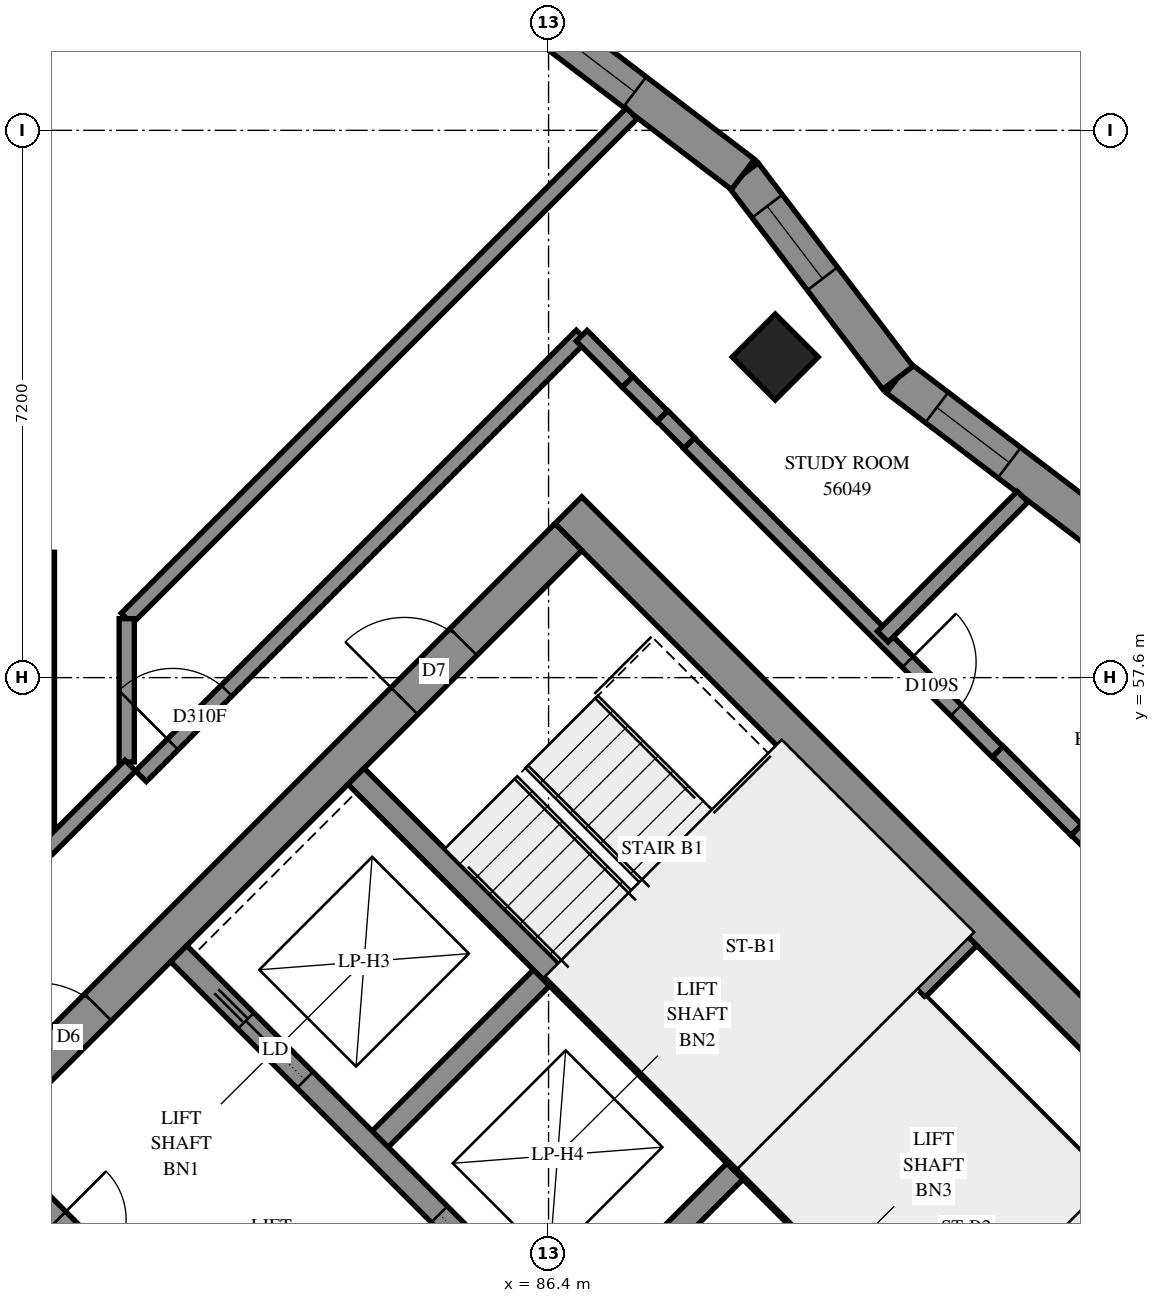
"""IFC4 building model, lengths in metres.
Left out: names, types, materials, properties, quantities, classifications, styles, units other than length and angle.
Written with IfcOpenShell. Run it as: python <this file> out.ifc"""

import sys

from ifc_helpers import new_model, si_unit, direction, frame, frame_2d, origin, origin_2d, place, context, subcontext, project, spatial, polyline, rectangle, outline, extrude, element, fill, save


model = new_model("IFC4")
c1 = context("Model", 3, precision=1e-05, world=origin(), true_north=direction((0.0, 1.0)))
c2 = subcontext(c1, "Body", "Model", "MODEL_VIEW")
j1 = project(units=[si_unit("LENGTHUNIT", "METRE"), si_unit("PLANEANGLEUNIT", "RADIAN")], contexts=[c1])
p1 = place(None, origin())
s1 = spatial("IfcSite", under=j1, at=p1, CompositionType="ELEMENT")
p2 = place(p1, origin())
s2 = spatial("IfcBuilding", under=s1, at=p2, CompositionType="ELEMENT")
p3 = place(p2, frame((0.0, 0.0, 206.6)))
s3 = spatial("IfcBuildingStorey", under=s2, at=p3, CompositionType="ELEMENT", Elevation=206.6)
p4 = place(p3, frame((89.382, 61.818, 0.0), z_axis=(0.0, 0.0, 1.0), x_axis=(0.7071067812, -0.7071067812, 0.0)))
e1 = element("IfcColumn", 1, at=p4, inside=s3, PredefinedType="COLUMN", context=c2, shape_type="SweptSolid", body=[
    extrude(rectangle(XDim=0.8, YDim=0.8, at=origin_2d()), origin(), (0.0, 0.0, 1.0), 3.1),
])
p5 = place(p3, frame((86.66, 59.802, -0.3), z_axis=(0.0, 0.0, 1.0), x_axis=(0.7071067812, -0.7071067812, 0.0)))
e2 = element("IfcWall", 2, at=p5, inside=s3, PredefinedType="SHEAR", context=c2, shape_type="SweptSolid", body=[
    extrude(rectangle(XDim=15.4, YDim=0.5, at=frame_2d((7.7, 0.0))), origin(), (0.0, 0.0, 1.0), 2.7),
])
p6 = place(p5, frame((10.5, 0.0, 0.3)))
e3 = element("IfcOpeningElement", 3, at=p6, cuts=e2, PredefinedType="OPENING", context=c2, shape_type="SweptSolid", body=[
    extrude(rectangle(XDim=0.8, YDim=2.1, at=frame_2d((0.4, 1.05))), frame((0.0, 0.26, 0.0), z_axis=(0.0, -1.0, 0.0), x_axis=(1.0, 0.0, 0.0)), (0.0, 0.0, 1.0), 0.52),
])
p7 = place(p3, frame((76.478, 49.267, -0.3), z_axis=(0.0, 0.0, 1.0), x_axis=(0.7071067812, 0.7071067812, 0.0)))
e4 = element("IfcWall", 4, at=p7, inside=s3, PredefinedType="SHEAR", context=c2, shape_type="SweptSolid", body=[
    extrude(rectangle(XDim=14.4, YDim=0.5, at=frame_2d((7.2, 0.0))), origin(), (0.0, 0.0, 1.0), 2.7),
])
p8 = place(p7, frame((4.55, 0.0, 0.3)))
e5 = element("IfcOpeningElement", 5, at=p8, cuts=e4, PredefinedType="OPENING", context=c2, shape_type="SweptSolid", body=[
    extrude(rectangle(XDim=1.1, YDim=2.1, at=frame_2d((0.55, 1.05))), frame((0.0, 0.26, 0.0), z_axis=(0.0, -1.0, 0.0), x_axis=(1.0, 0.0, 0.0)), (0.0, 0.0, 1.0), 0.52),
])
p9 = place(p7, frame((11.35, 0.0, 0.3)))
e6 = element("IfcOpeningElement", 6, at=p9, cuts=e4, PredefinedType="OPENING", context=c2, shape_type="SweptSolid", body=[
    extrude(rectangle(XDim=1.1, YDim=2.1, at=frame_2d((0.55, 1.05))), frame((0.0, 0.26, 0.0), z_axis=(0.0, -1.0, 0.0), x_axis=(1.0, 0.0, 0.0)), (0.0, 0.0, 1.0), 0.52),
])
p10 = place(p3, frame((84.079, 51.423, 0.0), z_axis=(0.0, 0.0, 1.0), x_axis=(0.7071219326, 0.7070916295, 0.0)))
e7 = element("IfcWall", 7, at=p10, inside=s3, PredefinedType="SOLIDWALL", context=c2, shape_type="SweptSolid", body=[
    extrude(rectangle(XDim=3.3, YDim=0.3, at=frame_2d((1.65, 0.0))), origin(), (0.0, 0.0, 1.0), 3.1),
])
p11 = place(p3, frame((86.625, 48.878, 0.0), z_axis=(0.0, 0.0, 1.0), x_axis=(0.7071067812, 0.7071067812, 0.0)))
e8 = element("IfcWall", 8, at=p11, inside=s3, PredefinedType="SOLIDWALL", context=c2, shape_type="SweptSolid", body=[
    extrude(rectangle(XDim=3.3, YDim=0.3, at=frame_2d((1.65, 0.0))), origin(), (0.0, 0.0, 1.0), 3.1),
])
p12 = place(p3, frame((78.988, 51.423, 0.0), z_axis=(0.0, 0.0, 1.0), x_axis=(0.7071067812, -0.7071067812, 0.0)))
e9 = element("IfcWall", 9, at=p12, inside=s3, PredefinedType="SOLIDWALL", context=c2, shape_type="SweptSolid", body=[
    extrude(rectangle(XDim=14.4, YDim=0.3, at=frame_2d((7.2, 0.0))), origin(), (0.0, 0.0, 1.0), 3.1),
])
p13 = place(p12, frame((1.35, 0.0, 0.0)))
e10 = element("IfcOpeningElement", 10, at=p13, cuts=e9, PredefinedType="OPENING", context=c2, shape_type="SweptSolid", body=[
    extrude(rectangle(XDim=0.9, YDim=2.1, at=frame_2d((0.45, 1.05))), frame((0.0, 0.16, 0.0), z_axis=(0.0, -1.0, 0.0), x_axis=(1.0, 0.0, 0.0)), (0.0, 0.0, 1.0), 0.32),
])
p14 = place(p12, frame((4.95, 0.0, 0.0)))
e11 = element("IfcOpeningElement", 11, at=p14, cuts=e9, PredefinedType="OPENING", context=c2, shape_type="SweptSolid", body=[
    extrude(rectangle(XDim=0.9, YDim=2.1, at=frame_2d((0.45, 1.05))), frame((0.0, 0.16, 0.0), z_axis=(0.0, -1.0, 0.0), x_axis=(1.0, 0.0, 0.0)), (0.0, 0.0, 1.0), 0.32),
])
p15 = place(p12, frame((8.55, 0.0, 0.0)))
e12 = element("IfcOpeningElement", 12, at=p15, cuts=e9, PredefinedType="OPENING", context=c2, shape_type="SweptSolid", body=[
    extrude(rectangle(XDim=0.9, YDim=2.1, at=frame_2d((0.45, 1.05))), frame((0.0, 0.16, 0.0), z_axis=(0.0, -1.0, 0.0), x_axis=(1.0, 0.0, 0.0)), (0.0, 0.0, 1.0), 0.32),
])
p16 = place(p12, frame((12.05, 0.0, 0.0)))
e13 = element("IfcOpeningElement", 13, at=p16, cuts=e9, PredefinedType="OPENING", context=c2, shape_type="SweptSolid", body=[
    extrude(rectangle(XDim=1.1, YDim=2.1, at=frame_2d((0.55, 1.05))), frame((0.0, 0.16, 0.0), z_axis=(0.0, -1.0, 0.0), x_axis=(1.0, 0.0, 0.0)), (0.0, 0.0, 1.0), 0.32),
])
p17 = place(p3, frame((81.534, 53.969, 0.0), z_axis=(0.0, 0.0, 1.0), x_axis=(0.707103309, -0.7071102534, 0.0)))
e14 = element("IfcWall", 14, at=p17, inside=s3, PredefinedType="SOLIDWALL", context=c2, shape_type="SweptSolid", body=[
    extrude(rectangle(XDim=14.4, YDim=0.3, at=frame_2d((7.2, 0.0))), origin(), (0.0, 0.0, 1.0), 3.1),
])
p18 = place(p17, frame((1.25, 0.0, 0.0)))
e15 = element("IfcOpeningElement", 15, at=p18, cuts=e14, PredefinedType="OPENING", context=c2, shape_type="SweptSolid", body=[
    extrude(rectangle(XDim=1.1, YDim=2.1, at=frame_2d((0.55, 1.05))), frame((0.0, 0.16, 0.0), z_axis=(0.0, -1.0, 0.0), x_axis=(1.0, 0.0, 0.0)), (0.0, 0.0, 1.0), 0.32),
])
p19 = place(p17, frame((4.85, 0.0, 0.0)))
e16 = element("IfcOpeningElement", 16, at=p19, cuts=e14, PredefinedType="OPENING", context=c2, shape_type="SweptSolid", body=[
    extrude(rectangle(XDim=1.1, YDim=2.1, at=frame_2d((0.55, 1.05))), frame((0.0, 0.16, 0.0), z_axis=(0.0, -1.0, 0.0), x_axis=(1.0, 0.0, 0.0)), (0.0, 0.0, 1.0), 0.32),
])
p20 = place(p17, frame((8.45, 0.0, 0.0)))
e17 = element("IfcOpeningElement", 17, at=p20, cuts=e14, PredefinedType="OPENING", context=c2, shape_type="SweptSolid", body=[
    extrude(rectangle(XDim=1.1, YDim=2.1, at=frame_2d((0.55, 1.05))), frame((0.0, 0.16, 0.0), z_axis=(0.0, -1.0, 0.0), x_axis=(1.0, 0.0, 0.0)), (0.0, 0.0, 1.0), 0.32),
])
p21 = place(p17, frame((12.05, 0.0, 0.0)))
e18 = element("IfcOpeningElement", 18, at=p21, cuts=e14, PredefinedType="OPENING", context=c2, shape_type="SweptSolid", body=[
    extrude(rectangle(XDim=1.1, YDim=2.1, at=frame_2d((0.55, 1.05))), frame((0.0, 0.16, 0.0), z_axis=(0.0, -1.0, 0.0), x_axis=(1.0, 0.0, 0.0)), (0.0, 0.0, 1.0), 0.32),
])
for number, where, z_axis, x_axis in (
    (19, (83.867, 56.302, 0.0), (0.0, 0.0, 1.0), (0.707, -0.707, 0.0)),
    (20, (88.958, 51.211, 0.0), (0.0, 0.0, 1.0), (0.707, -0.707, 0.0)),
):
    element("IfcWall", number, at=place(p3, frame(where, z_axis=z_axis, x_axis=x_axis)), inside=s3, PredefinedType="SOLIDWALL", context=c2, shape_type="SweptSolid", body=[
        extrude(rectangle(XDim=7.2, YDim=0.3, at=frame_2d((3.6, 0.0))), origin(), (0.0, 0.0, 1.0), 3.1),
    ])
p22 = place(p3, frame((88.958, 51.211, 0.0), z_axis=(0.0, 0.0, 1.0), x_axis=(0.7071067812, 0.7071067812, 0.0)))
e21 = element("IfcWall", 21, at=p22, inside=s3, PredefinedType="SOLIDWALL", context=c2, shape_type="SweptSolid", body=[
    extrude(rectangle(XDim=4.2, YDim=0.3, at=frame_2d((2.1, 0.0))), origin(), (0.0, 0.0, 1.0), 3.1),
])
p23 = place(p3, frame((93.671, 59.507, 0.0), z_axis=(0.0, 0.0, 1.0), x_axis=(-0.7955293007, 0.6059151193, 0.0)))
e22 = element("IfcWall", 22, at=p23, inside=s3, PredefinedType="SOLIDWALL", context=c2, shape_type="SweptSolid", body=[
    extrude(outline(polyline([(-0.034, -0.25), (3.33, -0.25), (3.397, 0.25), (0.034, 0.25), (-0.034, -0.25)])), origin(), (0.0, 0.0, 1.0), 3.1),
])
p24 = place(p23, frame((1.52, 0.0, 0.45)))
e23 = element("IfcOpeningElement", 23, at=p24, cuts=e22, PredefinedType="OPENING", context=c2, shape_type="SweptSolid", body=[
    extrude(rectangle(XDim=1.2, YDim=2.5, at=frame_2d((0.6, 1.25))), frame((0.0, 0.26, 0.0), z_axis=(0.0, -1.0, 0.0), x_axis=(1.0, 0.0, 0.0)), (0.0, 0.0, 1.0), 0.52),
])
p25 = place(p3, frame((90.996, 61.545, 0.0), z_axis=(0.0, 0.0, 1.0), x_axis=(-0.6059106346, 0.7955327164, 0.0)))
e24 = element("IfcWall", 24, at=p25, inside=s3, PredefinedType="SOLIDWALL", context=c2, shape_type="SweptSolid", body=[
    extrude(outline(polyline([(0.034, -0.25), (3.397, -0.25), (3.33, 0.25), (-0.034, 0.25), (0.034, -0.25)])), origin(), (0.0, 0.0, 1.0), 3.1),
])
p26 = place(p25, frame((1.638, 0.0, 0.45)))
e25 = element("IfcOpeningElement", 25, at=p26, cuts=e24, PredefinedType="OPENING", context=c2, shape_type="SweptSolid", body=[
    extrude(rectangle(XDim=1.2, YDim=2.5, at=frame_2d((0.6, 1.25))), frame((0.0, 0.26, 0.0), z_axis=(0.0, -1.0, 0.0), x_axis=(1.0, 0.0, 0.0)), (0.0, 0.0, 1.0), 0.52),
])
p27 = place(p3, frame((88.958, 64.221, 0.0), z_axis=(0.0, 0.0, 1.0), x_axis=(-0.7955293007, 0.6059151193, 0.0)))
e26 = element("IfcWall", 26, at=p27, inside=s3, PredefinedType="SOLIDWALL", context=c2, shape_type="SweptSolid", body=[
    extrude(outline(polyline([(-0.034, -0.25), (3.33, -0.25), (3.397, 0.25), (0.034, 0.25), (-0.034, -0.25)])), origin(), (0.0, 0.0, 1.0), 3.1),
])
p28 = place(p27, frame((1.789, 0.0, 0.45)))
e27 = element("IfcOpeningElement", 27, at=p28, cuts=e26, PredefinedType="OPENING", context=c2, shape_type="SweptSolid", body=[
    extrude(rectangle(XDim=1.2, YDim=2.5, at=frame_2d((0.6, 1.25))), frame((0.0, 0.26, 0.0), z_axis=(0.0, -1.0, 0.0), x_axis=(1.0, 0.0, 0.0)), (0.0, 0.0, 1.0), 0.52),
])
p29 = place(p3, frame((91.313, 53.354, 0.0), z_axis=(0.0, 0.0, 1.0), x_axis=(0.7071140275, -0.7070995348, 0.0)))
e28 = element("IfcWall", 28, at=p29, inside=s3, PredefinedType="PARTITIONING", context=c2, shape_type="SweptSolid", body=[
    extrude(rectangle(XDim=6.9, YDim=0.15, at=frame_2d((3.45, 0.0))), origin(), (0.0, 0.0, 1.0), 3.1),
])
p30 = place(p3, frame((80.849, 58.377, 0.0), z_axis=(0.0, 0.0, 1.0), x_axis=(0.7071121022, 0.7071014601, 0.0)))
e29 = element("IfcWall", 29, at=p30, inside=s3, PredefinedType="PARTITIONING", context=c2, shape_type="SweptSolid", body=[
    extrude(rectangle(XDim=9.397, YDim=0.2, at=frame_2d((4.698, 0.0))), origin(), (0.0, 0.0, 1.0), 3.1),
])
p31 = place(p3, frame((93.346, 55.599, 0.0), z_axis=(0.0, 0.0, 1.0), x_axis=(0.7071067812, -0.7071067812, 0.0)))
e30 = element("IfcWall", 30, at=p31, inside=s3, PredefinedType="PARTITIONING", context=c2, shape_type="SweptSolid", body=[
    extrude(rectangle(XDim=9.201, YDim=0.2, at=frame_2d((4.601, 0.0))), origin(), (0.0, 0.0, 1.0), 3.1),
])
p32 = place(p3, frame((81.037, 56.303, 0.0), z_axis=(0.0, 0.0, 1.0), x_axis=(0.7071067812, 0.7071067812, 0.0)))
e31 = element("IfcWall", 31, at=p32, inside=s3, PredefinedType="PARTITIONING", context=c2, shape_type="SweptSolid", body=[
    extrude(rectangle(XDim=8.2, YDim=0.2, at=frame_2d((4.1, 0.0))), origin(), (0.0, 0.0, 1.0), 3.1),
])
p33 = place(p32, frame((0.592, 0.0, 0.0)))
e32 = element("IfcOpeningElement", 32, at=p33, cuts=e31, PredefinedType="OPENING", context=c2, shape_type="SweptSolid", body=[
    extrude(rectangle(XDim=1.0, YDim=2.1, at=frame_2d((0.5, 1.05))), frame((0.0, 0.11, 0.0), z_axis=(0.0, -1.0, 0.0), x_axis=(1.0, 0.0, 0.0)), (0.0, 0.0, 1.0), 0.22),
])
p34 = place(p3, frame((88.247, 60.683, 0.0), z_axis=(0.0, 0.0, 1.0), x_axis=(0.7071067812, -0.7071067812, 0.0)))
e33 = element("IfcWall", 33, at=p34, inside=s3, PredefinedType="PARTITIONING", context=c2, shape_type="SweptSolid", body=[
    extrude(rectangle(XDim=5.742, YDim=0.2, at=frame_2d((2.871, 0.0))), origin(), (0.0, 0.0, 1.0), 3.1),
])
p35 = place(p34, frame((4.069, 0.0, 0.0)))
e34 = element("IfcOpeningElement", 34, at=p35, cuts=e33, PredefinedType="OPENING", context=c2, shape_type="SweptSolid", body=[
    extrude(rectangle(XDim=0.9, YDim=2.1, at=frame_2d((0.45, 1.05))), frame((0.0, 0.11, 0.0), z_axis=(0.0, -1.0, 0.0), x_axis=(1.0, 0.0, 0.0)), (0.0, 0.0, 1.0), 0.22),
])
p36 = place(p3, frame((79.8, 55.35, 0.0), z_axis=(0.0, 0.0, 1.0), x_axis=(0.0, 1.0, 0.0)))
e35 = element("IfcWall", 35, at=p36, inside=s3, PredefinedType="PARTITIONING", context=c2, shape_type="SweptSolid", body=[
    extrude(rectangle(XDim=3.9, YDim=0.2, at=frame_2d((1.95, 0.0))), origin(), (0.0, 0.0, 1.0), 3.1),
])
p37 = place(p3, frame((90.797, 58.139, 0.0), z_axis=(0.0, 0.0, 1.0), x_axis=(0.7066456247, 0.7075676371, 0.0)))
e36 = element("IfcWall", 36, at=p37, inside=s3, PredefinedType="PARTITIONING", context=c2, shape_type="SweptSolid", body=[
    extrude(rectangle(XDim=2.603, YDim=0.2, at=frame_2d((1.302, 0.0))), origin(), (0.0, 0.0, 1.0), 3.1),
])
p38 = place(p3, frame((80.85, 56.49, 0.0), z_axis=(0.0, 0.0, 1.0), x_axis=(0.0, 1.0, 0.0)))
e37 = element("IfcWall", 37, at=p38, inside=s3, PredefinedType="PARTITIONING", context=c2, shape_type="SweptSolid", body=[
    extrude(rectangle(XDim=1.886, YDim=0.2, at=frame_2d((0.943, 0.0))), origin(), (0.0, 0.0, 1.0), 3.1),
])
p39 = place(p3, frame((79.803, 55.347, 0.0), z_axis=(0.0, 0.0, 1.0), x_axis=(0.706460727, 0.7077522457, 0.0)))
e38 = element("IfcWall", 38, at=p39, inside=s3, PredefinedType="PARTITIONING", context=c2, shape_type="SweptSolid", body=[
    extrude(rectangle(XDim=1.549, YDim=0.2, at=frame_2d((0.774, 0.0))), origin(), (0.0, 0.0, 1.0), 3.1),
])
p40 = place(p3, frame((92.311, 56.627, 0.0), z_axis=(0.0, 0.0, 1.0), x_axis=(0.7077922938, -0.7064206033, 0.0)))
e39 = element("IfcWall", 39, at=p40, inside=s3, PredefinedType="PARTITIONING", context=c2, shape_type="SweptSolid", body=[
    extrude(rectangle(XDim=1.458, YDim=0.2, at=frame_2d((0.729, 0.0))), origin(), (0.0, 0.0, 1.0), 3.1),
])
p41 = place(p3, frame((86.835, 62.097, 0.0), z_axis=(0.0, 0.0, 1.0), x_axis=(0.7059370453, -0.7082745852, 0.0)))
e40 = element("IfcWall", 40, at=p41, inside=s3, PredefinedType="PARTITIONING", context=c2, shape_type="SweptSolid", body=[
    extrude(rectangle(XDim=0.856, YDim=0.2, at=frame_2d((0.428, 0.0))), origin(), (0.0, 0.0, 1.0), 3.1),
])
p42 = place(p3, frame((87.44, 61.492, 0.0), z_axis=(0.0, 0.0, 1.0), x_axis=(0.7086591505, -0.7055509963, 0.0)))
e41 = element("IfcWall", 41, at=p42, inside=s3, PredefinedType="PARTITIONING", context=c2, shape_type="SweptSolid", body=[
    extrude(rectangle(XDim=0.643, YDim=0.2, at=frame_2d((0.322, 0.0))), origin(), (0.0, 0.0, 1.0), 3.1),
])
p43 = place(p3, frame((87.899, 61.041, 0.0), z_axis=(0.0, 0.0, 1.0), x_axis=(0.7051008166, -0.7091070712, 0.0)))
e42 = element("IfcWall", 42, at=p43, inside=s3, PredefinedType="PARTITIONING", context=c2, shape_type="SweptSolid", body=[
    extrude(rectangle(XDim=0.499, YDim=0.2, at=frame_2d((0.25, 0.0))), origin(), (0.0, 0.0, 1.0), 3.1),
])
p44 = place(p24, origin())
e43 = element("IfcWindow", 43, at=p44, inside=s3, PartitioningType="SINGLE_PANEL", PredefinedType="WINDOW", context=c2, shape_type="SweptSolid", body=[
    extrude(rectangle(XDim=1.2, YDim=2.5, at=frame_2d((0.6, 1.25))), frame((0.0, 0.18, 0.0), z_axis=(0.0, -1.0, 0.0), x_axis=(1.0, 0.0, 0.0)), (0.0, 0.0, 1.0), 0.06),
])
fill(e23, e43)
p45 = place(p26, origin())
e44 = element("IfcWindow", 44, at=p45, inside=s3, PartitioningType="SINGLE_PANEL", PredefinedType="WINDOW", context=c2, shape_type="SweptSolid", body=[
    extrude(rectangle(XDim=1.2, YDim=2.5, at=frame_2d((0.6, 1.25))), frame((0.0, 0.18, 0.0), z_axis=(0.0, -1.0, 0.0), x_axis=(1.0, 0.0, 0.0)), (0.0, 0.0, 1.0), 0.06),
])
fill(e25, e44)
p46 = place(p28, origin())
e45 = element("IfcWindow", 45, at=p46, inside=s3, PartitioningType="SINGLE_PANEL", PredefinedType="WINDOW", context=c2, shape_type="SweptSolid", body=[
    extrude(rectangle(XDim=1.2, YDim=2.5, at=frame_2d((0.6, 1.25))), frame((0.0, 0.18, 0.0), z_axis=(0.0, -1.0, 0.0), x_axis=(1.0, 0.0, 0.0)), (0.0, 0.0, 1.0), 0.06),
])
fill(e27, e45)
p47 = place(p8, origin())
e46 = element("IfcDoor", 46, at=p47, inside=s3, OperationType="DOUBLE_DOOR_SINGLE_SWING", PredefinedType="DOOR", context=c2, shape_type="SweptSolid", body=[
    extrude(rectangle(XDim=1.1, YDim=2.1, at=frame_2d((0.55, 1.05))), frame((0.0, 0.025, 0.0), z_axis=(0.0, -1.0, 0.0), x_axis=(1.0, 0.0, 0.0)), (0.0, 0.0, 1.0), 0.05),
])
fill(e5, e46)
p48 = place(p9, origin())
e47 = element("IfcDoor", 47, at=p48, inside=s3, OperationType="SINGLE_SWING_LEFT", PredefinedType="DOOR", context=c2, shape_type="SweptSolid", body=[
    extrude(rectangle(XDim=1.1, YDim=2.1, at=frame_2d((0.55, 1.05))), frame((0.0, 0.025, 0.0), z_axis=(0.0, -1.0, 0.0), x_axis=(1.0, 0.0, 0.0)), (0.0, 0.0, 1.0), 0.05),
])
fill(e6, e47)
p49 = place(p13, origin())
e48 = element("IfcDoor", 48, at=p49, inside=s3, OperationType="SINGLE_SWING_LEFT", PredefinedType="DOOR", context=c2, shape_type="SweptSolid", body=[
    extrude(rectangle(XDim=0.9, YDim=2.1, at=frame_2d((0.45, 1.05))), frame((0.0, 0.025, 0.0), z_axis=(0.0, -1.0, 0.0), x_axis=(1.0, 0.0, 0.0)), (0.0, 0.0, 1.0), 0.05),
])
fill(e10, e48)
p50 = place(p18, origin())
e49 = element("IfcDoor", 49, at=p50, inside=s3, OperationType="SLIDING_TO_LEFT", PredefinedType="DOOR", context=c2, shape_type="SweptSolid", body=[
    extrude(rectangle(XDim=1.1, YDim=2.1, at=frame_2d((0.55, 1.05))), frame((0.0, 0.025, 0.0), z_axis=(0.0, -1.0, 0.0), x_axis=(1.0, 0.0, 0.0)), (0.0, 0.0, 1.0), 0.05),
])
fill(e15, e49)
p51 = place(p19, origin())
e50 = element("IfcDoor", 50, at=p51, inside=s3, OperationType="SLIDING_TO_RIGHT", PredefinedType="DOOR", context=c2, shape_type="SweptSolid", body=[
    extrude(rectangle(XDim=1.1, YDim=2.1, at=frame_2d((0.55, 1.05))), frame((0.0, 0.025, 0.0), z_axis=(0.0, -1.0, 0.0), x_axis=(1.0, 0.0, 0.0)), (0.0, 0.0, 1.0), 0.05),
])
fill(e16, e50)
p52 = place(p33, origin())
e51 = element("IfcDoor", 51, at=p52, inside=s3, OperationType="SINGLE_SWING_RIGHT", PredefinedType="DOOR", context=c2, shape_type="SweptSolid", body=[
    extrude(rectangle(XDim=1.0, YDim=2.1, at=frame_2d((0.5, 1.05))), frame((0.0, 0.025, 0.0), z_axis=(0.0, -1.0, 0.0), x_axis=(1.0, 0.0, 0.0)), (0.0, 0.0, 1.0), 0.05),
])
fill(e32, e51)
p53 = place(p35, origin())
e52 = element("IfcDoor", 52, at=p53, inside=s3, OperationType="SINGLE_SWING_RIGHT", PredefinedType="DOOR", context=c2, shape_type="SweptSolid", body=[
    extrude(rectangle(XDim=0.9, YDim=2.1, at=frame_2d((0.45, 1.05))), frame((0.0, 0.025, 0.0), z_axis=(0.0, -1.0, 0.0), x_axis=(1.0, 0.0, 0.0)), (0.0, 0.0, 1.0), 0.05),
])
fill(e34, e52)
save(model, sys.argv[1])
